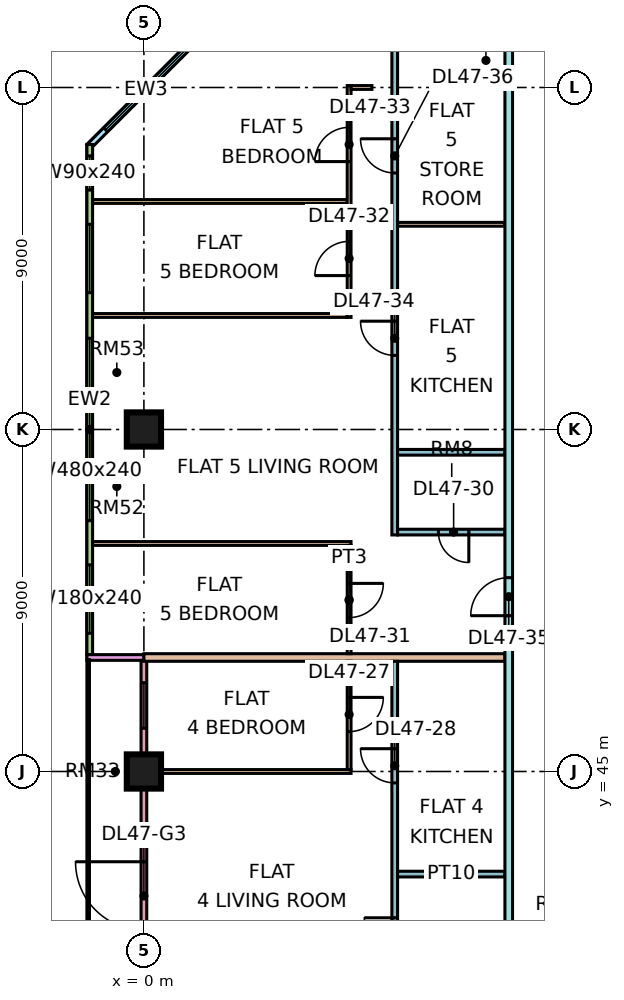
"""IFC4 building model, lengths in metres.
Left out: names, types, materials, properties, quantities, classifications, styles, units other than length and angle.
Written with IfcOpenShell. Run it as: python <this file> out.ifc"""

import sys

from ifc_helpers import new_model, si_unit, direction, frame, frame_2d, origin, origin_2d, place, context, subcontext, project, spatial, rectangle, extrude, element, fill, save


model = new_model("IFC4")
c1 = context("Model", 3, precision=1e-05, world=origin(), true_north=direction((0.0, 1.0)))
c2 = subcontext(c1, "Body", "Model", "MODEL_VIEW")
j1 = project(units=[si_unit("LENGTHUNIT", "METRE"), si_unit("PLANEANGLEUNIT", "RADIAN")], contexts=[c1])
p1 = place(None, origin())
s1 = spatial("IfcSite", under=j1, at=p1, CompositionType="ELEMENT")
p2 = place(p1, origin())
s2 = spatial("IfcBuilding", under=s1, at=p2, CompositionType="ELEMENT")
p3 = place(p2, frame((0.0, 0.0, 202.4)))
s3 = spatial("IfcBuildingStorey", under=s2, at=p3, CompositionType="ELEMENT", Elevation=202.4)
for number, where, z_axis, x_axis in (
    (1, (0.0, 45.0, 0.0), (0.0, 0.0, 1.0), (1.0, 0.0, 0.0)),
    (2, (0.0, 54.0, 0.0), (0.0, 0.0, 1.0), (1.0, 0.0, 0.0)),
):
    element("IfcColumn", number, at=place(p3, frame(where, z_axis=z_axis, x_axis=x_axis)), inside=s3, PredefinedType="COLUMN", context=c2, shape_type="SweptSolid", body=[
        extrude(rectangle(XDim=0.9, YDim=0.9, at=origin_2d()), origin(), (0.0, 0.0, 1.0), 3.75),
    ])
p4 = place(p3, frame((1.553, 64.447, 0.0), z_axis=(0.0, 0.0, 1.0), x_axis=(-0.707106781187, -0.707106781187, 0.0)))
e3 = element("IfcWall", 3, at=p4, inside=s3, PredefinedType="SOLIDWALL", context=c2, shape_type="SweptSolid", body=[
    extrude(rectangle(XDim=4.243, YDim=0.15, at=frame_2d((2.121, 0.0))), origin(), (0.0, 0.0, 1.0), 3.3),
])
p5 = place(p4, frame((0.621, 0.0, 0.45)))
e4 = element("IfcOpeningElement", 4, at=p5, cuts=e3, PredefinedType="OPENING", context=c2, shape_type="SweptSolid", body=[
    extrude(rectangle(XDim=3.0, YDim=2.4, at=frame_2d((1.5, 1.2))), frame((0.0, 0.085, 0.0), z_axis=(0.0, -1.0, 0.0), x_axis=(1.0, 0.0, 0.0)), (0.0, 0.0, 1.0), 0.17),
])
p6 = place(p3, frame((-1.425, 61.5, 0.0), z_axis=(0.0, 0.0, 1.0), x_axis=(0.0, -1.0, 0.0)))
e5 = element("IfcWall", 5, at=p6, inside=s3, PredefinedType="SOLIDWALL", context=c2, shape_type="SweptSolid", body=[
    extrude(rectangle(XDim=13.425, YDim=0.15, at=frame_2d((6.712, 0.0))), origin(), (0.0, 0.0, 1.0), 3.3),
])
p7 = place(p6, frame((0.3, 0.0, 0.45)))
e6 = element("IfcOpeningElement", 6, at=p7, cuts=e5, PredefinedType="OPENING", context=c2, shape_type="SweptSolid", body=[
    extrude(rectangle(XDim=0.9, YDim=2.4, at=frame_2d((0.45, 1.2))), frame((0.0, 0.085, 0.0), z_axis=(0.0, -1.0, 0.0), x_axis=(1.0, 0.0, 0.0)), (0.0, 0.0, 1.0), 0.17),
])
p8 = place(p6, frame((2.1, 0.0, 0.45)))
e7 = element("IfcOpeningElement", 7, at=p8, cuts=e5, PredefinedType="OPENING", context=c2, shape_type="SweptSolid", body=[
    extrude(rectangle(XDim=1.8, YDim=2.4, at=frame_2d((0.9, 1.2))), frame((0.0, 0.085, 0.0), z_axis=(0.0, -1.0, 0.0), x_axis=(1.0, 0.0, 0.0)), (0.0, 0.0, 1.0), 0.17),
])
p9 = place(p6, frame((5.1, 0.0, 0.45)))
e8 = element("IfcOpeningElement", 8, at=p9, cuts=e5, PredefinedType="OPENING", context=c2, shape_type="SweptSolid", body=[
    extrude(rectangle(XDim=4.8, YDim=2.4, at=frame_2d((2.4, 1.2))), frame((0.0, 0.085, 0.0), z_axis=(0.0, -1.0, 0.0), x_axis=(1.0, 0.0, 0.0)), (0.0, 0.0, 1.0), 0.17),
])
p10 = place(p6, frame((11.062, 0.0, 0.45)))
e9 = element("IfcOpeningElement", 9, at=p10, cuts=e5, PredefinedType="OPENING", context=c2, shape_type="SweptSolid", body=[
    extrude(rectangle(XDim=1.8, YDim=2.4, at=frame_2d((0.9, 1.2))), frame((0.0, 0.085, 0.0), z_axis=(0.0, -1.0, 0.0), x_axis=(1.0, 0.0, 0.0)), (0.0, 0.0, 1.0), 0.17),
])
p11 = place(p3, frame((0.0, 47.925, 0.0), z_axis=(0.0, 0.0, 1.0), x_axis=(0.0, -1.0, 0.0)))
e10 = element("IfcWall", 10, at=p11, inside=s3, PredefinedType="SOLIDWALL", context=c2, shape_type="SweptSolid", body=[
    extrude(rectangle(XDim=11.85, YDim=0.15, at=frame_2d((5.925, 0.0))), origin(), (0.0, 0.0, 1.0), 3.3),
])
p12 = place(p11, frame((0.587, 0.0, 0.45)))
e11 = element("IfcOpeningElement", 11, at=p12, cuts=e10, PredefinedType="OPENING", context=c2, shape_type="SweptSolid", body=[
    extrude(rectangle(XDim=1.2, YDim=2.4, at=frame_2d((0.6, 1.2))), frame((0.0, 0.085, 0.0), z_axis=(0.0, -1.0, 0.0), x_axis=(1.0, 0.0, 0.0)), (0.0, 0.0, 1.0), 0.17),
])
p13 = place(p11, frame((5.3, 0.0, 0.0)))
e12 = element("IfcOpeningElement", 12, at=p13, cuts=e10, PredefinedType="OPENING", context=c2, shape_type="SweptSolid", body=[
    extrude(rectangle(XDim=1.8, YDim=2.4, at=frame_2d((0.9, 1.2))), frame((0.0, 0.085, 0.0), z_axis=(0.0, -1.0, 0.0), x_axis=(1.0, 0.0, 0.0)), (0.0, 0.0, 1.0), 0.17),
])
p14 = place(p11, frame((9.55, 0.0, 0.45)))
e13 = element("IfcOpeningElement", 13, at=p14, cuts=e10, PredefinedType="OPENING", context=c2, shape_type="SweptSolid", body=[
    extrude(rectangle(XDim=1.2, YDim=2.4, at=frame_2d((0.6, 1.2))), frame((0.0, 0.085, 0.0), z_axis=(0.0, -1.0, 0.0), x_axis=(1.0, 0.0, 0.0)), (0.0, 0.0, 1.0), 0.17),
])
p15 = place(p3, frame((-1.5, 48.0, 0.0), z_axis=(0.0, 0.0, 1.0), x_axis=(1.0, 0.0, 0.0)))
e14 = element("IfcWall", 14, at=p15, inside=s3, PredefinedType="SOLIDWALL", context=c2, shape_type="SweptSolid", body=[
    extrude(rectangle(XDim=1.5, YDim=0.15, at=frame_2d((0.75, 0.0))), origin(), (0.0, 0.0, 1.0), 3.3),
])
p16 = place(p3, frame((-1.351, 60.0, 0.0), z_axis=(0.0, 0.0, 1.0), x_axis=(1.0, 0.0, 0.0)))
e15 = element("IfcWall", 15, at=p16, inside=s3, PredefinedType="PARTITIONING", context=c2, shape_type="SweptSolid", body=[
    extrude(rectangle(XDim=6.701, YDim=0.1, at=frame_2d((3.351, 0.0))), origin(), (0.0, 0.0, 1.0), 3.3),
])
p17 = place(p3, frame((0.0, 48.0, 0.0), z_axis=(0.0, 0.0, 1.0), x_axis=(1.0, 0.0, 0.0)))
e16 = element("IfcWall", 16, at=p17, inside=s3, PredefinedType="PARTITIONING", context=c2, shape_type="SweptSolid", body=[
    extrude(rectangle(XDim=9.5, YDim=0.2, at=frame_2d((4.75, 0.0))), origin(), (0.0, 0.0, 1.0), 3.3),
])
p18 = place(p3, frame((-1.35, 51.0, 0.0), z_axis=(0.0, 0.0, 1.0), x_axis=(1.0, 0.0, 0.0)))
e17 = element("IfcWall", 17, at=p18, inside=s3, PredefinedType="PARTITIONING", context=c2, shape_type="SweptSolid", body=[
    extrude(rectangle(XDim=6.8, YDim=0.1, at=frame_2d((3.4, 0.0))), origin(), (0.0, 0.0, 1.0), 3.3),
])
p19 = place(p3, frame((-1.35, 57.0, 0.0), z_axis=(0.0, 0.0, 1.0), x_axis=(1.0, 0.0, 0.0)))
e18 = element("IfcWall", 18, at=p19, inside=s3, PredefinedType="PARTITIONING", context=c2, shape_type="SweptSolid", body=[
    extrude(rectangle(XDim=6.7, YDim=0.1, at=frame_2d((3.35, 0.0))), origin(), (0.0, 0.0, 1.0), 3.3),
])
p20 = place(p3, frame((0.074, 45.0, 0.0), z_axis=(0.0, 0.0, 1.0), x_axis=(1.0, 0.0, 0.0)))
e19 = element("IfcWall", 19, at=p20, inside=s3, PredefinedType="PARTITIONING", context=c2, shape_type="SweptSolid", body=[
    extrude(rectangle(XDim=5.376, YDim=0.1, at=frame_2d((2.688, 0.0))), origin(), (0.0, 0.0, 1.0), 3.3),
])
p21 = place(p3, frame((5.4, 45.05, 0.0), z_axis=(0.0, 0.0, 1.0), x_axis=(0.0, 1.0, 0.0)))
e20 = element("IfcWall", 20, at=p21, inside=s3, PredefinedType="PARTITIONING", context=c2, shape_type="SweptSolid", body=[
    extrude(rectangle(XDim=2.85, YDim=0.1, at=frame_2d((1.425, 0.0))), origin(), (0.0, 0.0, 1.0), 3.3),
])
p22 = place(p21, frame((1.0, 0.0, 0.0)))
e21 = element("IfcOpeningElement", 21, at=p22, cuts=e20, PredefinedType="OPENING", context=c2, shape_type="SweptSolid", body=[
    extrude(rectangle(XDim=0.9, YDim=2.1, at=frame_2d((0.45, 1.05))), frame((0.0, 0.06, 0.0), z_axis=(0.0, -1.0, 0.0), x_axis=(1.0, 0.0, 0.0)), (0.0, 0.0, 1.0), 0.12),
])
p23 = place(p3, frame((5.4, 48.1, 0.0), z_axis=(0.0, 0.0, 1.0), x_axis=(0.0, 1.0, 0.0)))
e22 = element("IfcWall", 22, at=p23, inside=s3, PredefinedType="PARTITIONING", context=c2, shape_type="SweptSolid", body=[
    extrude(rectangle(XDim=2.85, YDim=0.1, at=frame_2d((1.425, 0.0))), origin(), (0.0, 0.0, 1.0), 3.3),
])
p24 = place(p23, frame((0.95, 0.0, 0.0)))
e23 = element("IfcOpeningElement", 23, at=p24, cuts=e22, PredefinedType="OPENING", context=c2, shape_type="SweptSolid", body=[
    extrude(rectangle(XDim=0.9, YDim=2.1, at=frame_2d((0.45, 1.05))), frame((0.0, 0.06, 0.0), z_axis=(0.0, -1.0, 0.0), x_axis=(1.0, 0.0, 0.0)), (0.0, 0.0, 1.0), 0.12),
])
p25 = place(p3, frame((5.4, 56.95, 0.0), z_axis=(0.0, 0.0, 1.0), x_axis=(0.0, 1.0, 0.0)))
e24 = element("IfcWall", 24, at=p25, inside=s3, PredefinedType="PARTITIONING", context=c2, shape_type="SweptSolid", body=[
    extrude(rectangle(XDim=6.1, YDim=0.1, at=frame_2d((3.05, 0.0))), origin(), (0.0, 0.0, 1.0), 3.3),
])
p26 = place(p25, frame((1.1, 0.0, 0.0)))
e25 = element("IfcOpeningElement", 25, at=p26, cuts=e24, PredefinedType="OPENING", context=c2, shape_type="SweptSolid", body=[
    extrude(rectangle(XDim=0.9, YDim=2.1, at=frame_2d((0.45, 1.05))), frame((0.0, 0.06, 0.0), z_axis=(0.0, -1.0, 0.0), x_axis=(1.0, 0.0, 0.0)), (0.0, 0.0, 1.0), 0.12),
])
p27 = place(p25, frame((4.1, 0.0, 0.0)))
e26 = element("IfcOpeningElement", 26, at=p27, cuts=e24, PredefinedType="OPENING", context=c2, shape_type="SweptSolid", body=[
    extrude(rectangle(XDim=0.9, YDim=2.1, at=frame_2d((0.45, 1.05))), frame((0.0, 0.06, 0.0), z_axis=(0.0, -1.0, 0.0), x_axis=(1.0, 0.0, 0.0)), (0.0, 0.0, 1.0), 0.12),
])
p28 = place(p3, frame((5.45, 63.0, 0.0), z_axis=(0.0, 0.0, 1.0), x_axis=(1.0, 0.0, 0.0)))
e27 = element("IfcWall", 27, at=p28, inside=s3, PredefinedType="PARTITIONING", context=c2, shape_type="SweptSolid", body=[
    extrude(rectangle(XDim=0.55, YDim=0.1, at=frame_2d((0.275, 0.0))), origin(), (0.0, 0.0, 1.0), 3.3),
])
p29 = place(p3, frame((6.6, 39.225, 0.0), z_axis=(0.0, 0.0, 1.0), x_axis=(0.0, 1.0, 0.0)))
e28 = element("IfcWall", 28, at=p29, inside=s3, PredefinedType="PARTITIONING", context=c2, shape_type="SweptSolid", body=[
    extrude(rectangle(XDim=8.675, YDim=0.15, at=frame_2d((4.337, 0.0))), origin(), (0.0, 0.0, 1.0), 3.3),
])
p30 = place(p29, frame((1.125, 0.0, 0.0)))
e29 = element("IfcOpeningElement", 29, at=p30, cuts=e28, PredefinedType="OPENING", context=c2, shape_type="SweptSolid", body=[
    extrude(rectangle(XDim=0.8, YDim=2.1, at=frame_2d((0.4, 1.05))), frame((0.0, 0.085, 0.0), z_axis=(0.0, -1.0, 0.0), x_axis=(1.0, 0.0, 0.0)), (0.0, 0.0, 1.0), 0.17),
])
p31 = place(p29, frame((5.475, 0.0, 0.0)))
e30 = element("IfcOpeningElement", 30, at=p31, cuts=e28, PredefinedType="OPENING", context=c2, shape_type="SweptSolid", body=[
    extrude(rectangle(XDim=0.9, YDim=2.1, at=frame_2d((0.45, 1.05))), frame((0.0, 0.085, 0.0), z_axis=(0.0, -1.0, 0.0), x_axis=(1.0, 0.0, 0.0)), (0.0, 0.0, 1.0), 0.17),
])
p32 = place(p3, frame((6.6, 51.225, 0.0), z_axis=(0.0, 0.0, 1.0), x_axis=(0.0, 1.0, 0.0)))
e31 = element("IfcWall", 31, at=p32, inside=s3, PredefinedType="PARTITIONING", context=c2, shape_type="SweptSolid", body=[
    extrude(rectangle(XDim=13.125, YDim=0.15, at=frame_2d((6.562, 0.0))), origin(), (0.0, 0.0, 1.0), 3.3),
])
p33 = place(p32, frame((4.725, 0.0, 0.0)))
e32 = element("IfcOpeningElement", 32, at=p33, cuts=e31, PredefinedType="OPENING", context=c2, shape_type="SweptSolid", body=[
    extrude(rectangle(XDim=0.9, YDim=2.1, at=frame_2d((0.45, 1.05))), frame((0.0, 0.085, 0.0), z_axis=(0.0, -1.0, 0.0), x_axis=(1.0, 0.0, 0.0)), (0.0, 0.0, 1.0), 0.17),
])
p34 = place(p32, frame((9.525, 0.0, 0.0)))
e33 = element("IfcOpeningElement", 33, at=p34, cuts=e31, PredefinedType="OPENING", context=c2, shape_type="SweptSolid", body=[
    extrude(rectangle(XDim=0.9, YDim=2.1, at=frame_2d((0.45, 1.05))), frame((0.0, 0.085, 0.0), z_axis=(0.0, -1.0, 0.0), x_axis=(1.0, 0.0, 0.0)), (0.0, 0.0, 1.0), 0.17),
])
p35 = place(p3, frame((6.675, 42.3, 0.0), z_axis=(0.0, 0.0, 1.0), x_axis=(1.0, 0.0, 0.0)))
e34 = element("IfcWall", 34, at=p35, inside=s3, PredefinedType="PARTITIONING", context=c2, shape_type="SweptSolid", body=[
    extrude(rectangle(XDim=2.825, YDim=0.15, at=frame_2d((1.413, 0.0))), origin(), (0.0, 0.0, 1.0), 3.3),
])
p36 = place(p3, frame((6.675, 51.3, 0.0), z_axis=(0.0, 0.0, 1.0), x_axis=(1.0, 0.0, 0.0)))
e35 = element("IfcWall", 35, at=p36, inside=s3, PredefinedType="PARTITIONING", context=c2, shape_type="SweptSolid", body=[
    extrude(rectangle(XDim=2.825, YDim=0.15, at=frame_2d((1.413, 0.0))), origin(), (0.0, 0.0, 1.0), 3.3),
])
p37 = place(p36, frame((1.075, 0.0, 0.0)))
e36 = element("IfcOpeningElement", 36, at=p37, cuts=e35, PredefinedType="OPENING", context=c2, shape_type="SweptSolid", body=[
    extrude(rectangle(XDim=0.8, YDim=2.1, at=frame_2d((0.4, 1.05))), frame((0.0, 0.085, 0.0), z_axis=(0.0, -1.0, 0.0), x_axis=(1.0, 0.0, 0.0)), (0.0, 0.0, 1.0), 0.17),
])
p38 = place(p3, frame((6.675, 53.4, 0.0), z_axis=(0.0, 0.0, 1.0), x_axis=(1.0, 0.0, 0.0)))
e37 = element("IfcWall", 37, at=p38, inside=s3, PredefinedType="PARTITIONING", context=c2, shape_type="SweptSolid", body=[
    extrude(rectangle(XDim=2.825, YDim=0.15, at=frame_2d((1.413, 0.0))), origin(), (0.0, 0.0, 1.0), 3.3),
])
p39 = place(p3, frame((6.675, 59.4, 0.0), z_axis=(0.0, 0.0, 1.0), x_axis=(1.0, 0.0, 0.0)))
e38 = element("IfcWall", 38, at=p39, inside=s3, PredefinedType="PARTITIONING", context=c2, shape_type="SweptSolid", body=[
    extrude(rectangle(XDim=2.825, YDim=0.1, at=frame_2d((1.413, 0.0))), origin(), (0.0, 0.0, 1.0), 3.3),
])
p40 = place(p3, frame((9.6, 20.0, 0.0), z_axis=(0.0, 0.0, 1.0), x_axis=(0.0, 1.0, 0.0)))
e39 = element("IfcWall", 39, at=p40, inside=s3, PredefinedType="PARTITIONING", context=c2, shape_type="SweptSolid", body=[
    extrude(rectangle(XDim=44.35, YDim=0.2, at=frame_2d((22.175, 0.0))), origin(), (0.0, 0.0, 1.0), 3.3),
])
p41 = place(p40, frame((17.1, 0.0, 0.0)))
e40 = element("IfcOpeningElement", 40, at=p41, cuts=e39, PredefinedType="OPENING", context=c2, shape_type="SweptSolid", body=[
    extrude(rectangle(XDim=1.0, YDim=2.1, at=frame_2d((0.5, 1.05))), frame((0.0, 0.11, 0.0), z_axis=(0.0, -1.0, 0.0), x_axis=(1.0, 0.0, 0.0)), (0.0, 0.0, 1.0), 0.22),
])
p42 = place(p40, frame((29.1, 0.0, 0.0)))
e41 = element("IfcOpeningElement", 41, at=p42, cuts=e39, PredefinedType="OPENING", context=c2, shape_type="SweptSolid", body=[
    extrude(rectangle(XDim=1.0, YDim=2.1, at=frame_2d((0.5, 1.05))), frame((0.0, 0.11, 0.0), z_axis=(0.0, -1.0, 0.0), x_axis=(1.0, 0.0, 0.0)), (0.0, 0.0, 1.0), 0.22),
])
p43 = place(p40, frame((0.6, 0.0, 0.0)))
e42 = element("IfcOpeningElement", 42, at=p43, cuts=e39, PredefinedType="OPENING", context=c2, shape_type="SweptSolid", body=[
    extrude(rectangle(XDim=1.2, YDim=2.1, at=frame_2d((0.6, 1.05))), frame((0.0, 0.11, 0.0), z_axis=(0.0, -1.0, 0.0), x_axis=(1.0, 0.0, 0.0)), (0.0, 0.0, 1.0), 0.22),
])
p44 = place(p40, frame((4.35, 0.0, 0.0)))
e43 = element("IfcOpeningElement", 43, at=p44, cuts=e39, PredefinedType="OPENING", context=c2, shape_type="SweptSolid", body=[
    extrude(rectangle(XDim=1.0, YDim=2.1, at=frame_2d((0.5, 1.05))), frame((0.0, 0.11, 0.0), z_axis=(0.0, -1.0, 0.0), x_axis=(1.0, 0.0, 0.0)), (0.0, 0.0, 1.0), 0.22),
])
p45 = place(p5, origin())
e44 = element("IfcWindow", 44, at=p45, inside=s3, PartitioningType="SINGLE_PANEL", PredefinedType="WINDOW", context=c2, shape_type="SweptSolid", body=[
    extrude(rectangle(XDim=3.0, YDim=2.4, at=frame_2d((1.5, 1.2))), frame((0.0, 0.03, 0.0), z_axis=(0.0, -1.0, 0.0), x_axis=(1.0, 0.0, 0.0)), (0.0, 0.0, 1.0), 0.06),
])
fill(e4, e44)
p46 = place(p7, origin())
e45 = element("IfcWindow", 45, at=p46, inside=s3, PartitioningType="SINGLE_PANEL", PredefinedType="WINDOW", context=c2, shape_type="SweptSolid", body=[
    extrude(rectangle(XDim=0.9, YDim=2.4, at=frame_2d((0.45, 1.2))), frame((0.0, 0.03, 0.0), z_axis=(0.0, -1.0, 0.0), x_axis=(1.0, 0.0, 0.0)), (0.0, 0.0, 1.0), 0.06),
])
fill(e6, e45)
p47 = place(p8, origin())
e46 = element("IfcWindow", 46, at=p47, inside=s3, PartitioningType="SINGLE_PANEL", PredefinedType="WINDOW", context=c2, shape_type="SweptSolid", body=[
    extrude(rectangle(XDim=1.8, YDim=2.4, at=frame_2d((0.9, 1.2))), frame((0.0, 0.03, 0.0), z_axis=(0.0, -1.0, 0.0), x_axis=(1.0, 0.0, 0.0)), (0.0, 0.0, 1.0), 0.06),
])
fill(e7, e46)
p48 = place(p9, origin())
e47 = element("IfcWindow", 47, at=p48, inside=s3, PartitioningType="SINGLE_PANEL", PredefinedType="WINDOW", context=c2, shape_type="SweptSolid", body=[
    extrude(rectangle(XDim=4.8, YDim=2.4, at=frame_2d((2.4, 1.2))), frame((0.0, 0.03, 0.0), z_axis=(0.0, -1.0, 0.0), x_axis=(1.0, 0.0, 0.0)), (0.0, 0.0, 1.0), 0.06),
])
fill(e8, e47)
p49 = place(p10, origin())
e48 = element("IfcWindow", 48, at=p49, inside=s3, PartitioningType="SINGLE_PANEL", PredefinedType="WINDOW", context=c2, shape_type="SweptSolid", body=[
    extrude(rectangle(XDim=1.8, YDim=2.4, at=frame_2d((0.9, 1.2))), frame((0.0, 0.03, 0.0), z_axis=(0.0, -1.0, 0.0), x_axis=(1.0, 0.0, 0.0)), (0.0, 0.0, 1.0), 0.06),
])
fill(e9, e48)
p50 = place(p12, origin())
e49 = element("IfcWindow", 49, at=p50, inside=s3, PartitioningType="SINGLE_PANEL", PredefinedType="WINDOW", context=c2, shape_type="SweptSolid", body=[
    extrude(rectangle(XDim=1.2, YDim=2.4, at=frame_2d((0.6, 1.2))), frame((0.0, 0.03, 0.0), z_axis=(0.0, -1.0, 0.0), x_axis=(1.0, 0.0, 0.0)), (0.0, 0.0, 1.0), 0.06),
])
fill(e11, e49)
p51 = place(p13, frame((1.8, 0.0, 0.0), z_axis=(0.0, 0.0, 1.0), x_axis=(-1.0, 0.0, 0.0)))
e50 = element("IfcDoor", 50, at=p51, inside=s3, OperationType="DOUBLE_DOOR_SINGLE_SWING", PredefinedType="DOOR", context=c2, shape_type="SweptSolid", body=[
    extrude(rectangle(XDim=1.8, YDim=2.4, at=frame_2d((0.9, 1.2))), frame((0.0, 0.025, 0.0), z_axis=(0.0, -1.0, 0.0), x_axis=(1.0, 0.0, 0.0)), (0.0, 0.0, 1.0), 0.05),
])
fill(e12, e50)
p52 = place(p30, frame((0.8, 0.0, 0.0), z_axis=(0.0, 0.0, 1.0), x_axis=(-1.0, 0.0, 0.0)))
e51 = element("IfcDoor", 51, at=p52, inside=s3, OperationType="SINGLE_SWING_RIGHT", PredefinedType="DOOR", context=c2, shape_type="SweptSolid", body=[
    extrude(rectangle(XDim=0.8, YDim=2.1, at=frame_2d((0.4, 1.05))), frame((0.0, 0.025, 0.0), z_axis=(0.0, -1.0, 0.0), x_axis=(1.0, 0.0, 0.0)), (0.0, 0.0, 1.0), 0.05),
])
fill(e29, e51)
p53 = place(p22, origin())
e52 = element("IfcDoor", 52, at=p53, inside=s3, OperationType="SINGLE_SWING_RIGHT", PredefinedType="DOOR", context=c2, shape_type="SweptSolid", body=[
    extrude(rectangle(XDim=0.9, YDim=2.1, at=frame_2d((0.45, 1.05))), frame((0.0, 0.025, 0.0), z_axis=(0.0, -1.0, 0.0), x_axis=(1.0, 0.0, 0.0)), (0.0, 0.0, 1.0), 0.05),
])
fill(e21, e52)
p54 = place(p31, frame((0.9, 0.0, 0.0), z_axis=(0.0, 0.0, 1.0), x_axis=(-1.0, 0.0, 0.0)))
e53 = element("IfcDoor", 53, at=p54, inside=s3, OperationType="SINGLE_SWING_RIGHT", PredefinedType="DOOR", context=c2, shape_type="SweptSolid", body=[
    extrude(rectangle(XDim=0.9, YDim=2.1, at=frame_2d((0.45, 1.05))), frame((0.0, 0.025, 0.0), z_axis=(0.0, -1.0, 0.0), x_axis=(1.0, 0.0, 0.0)), (0.0, 0.0, 1.0), 0.05),
])
fill(e30, e53)
p55 = place(p37, origin())
e54 = element("IfcDoor", 54, at=p55, inside=s3, OperationType="SINGLE_SWING_RIGHT", PredefinedType="DOOR", context=c2, shape_type="SweptSolid", body=[
    extrude(rectangle(XDim=0.8, YDim=2.1, at=frame_2d((0.4, 1.05))), frame((0.0, 0.025, 0.0), z_axis=(0.0, -1.0, 0.0), x_axis=(1.0, 0.0, 0.0)), (0.0, 0.0, 1.0), 0.05),
])
fill(e36, e54)
p56 = place(p24, origin())
e55 = element("IfcDoor", 55, at=p56, inside=s3, OperationType="SINGLE_SWING_RIGHT", PredefinedType="DOOR", context=c2, shape_type="SweptSolid", body=[
    extrude(rectangle(XDim=0.9, YDim=2.1, at=frame_2d((0.45, 1.05))), frame((0.0, 0.025, 0.0), z_axis=(0.0, -1.0, 0.0), x_axis=(1.0, 0.0, 0.0)), (0.0, 0.0, 1.0), 0.05),
])
fill(e23, e55)
p57 = place(p26, origin())
e56 = element("IfcDoor", 56, at=p57, inside=s3, OperationType="SINGLE_SWING_LEFT", PredefinedType="DOOR", context=c2, shape_type="SweptSolid", body=[
    extrude(rectangle(XDim=0.9, YDim=2.1, at=frame_2d((0.45, 1.05))), frame((0.0, 0.025, 0.0), z_axis=(0.0, -1.0, 0.0), x_axis=(1.0, 0.0, 0.0)), (0.0, 0.0, 1.0), 0.05),
])
fill(e25, e56)
p58 = place(p27, origin())
e57 = element("IfcDoor", 57, at=p58, inside=s3, OperationType="SINGLE_SWING_LEFT", PredefinedType="DOOR", context=c2, shape_type="SweptSolid", body=[
    extrude(rectangle(XDim=0.9, YDim=2.1, at=frame_2d((0.45, 1.05))), frame((0.0, 0.025, 0.0), z_axis=(0.0, -1.0, 0.0), x_axis=(1.0, 0.0, 0.0)), (0.0, 0.0, 1.0), 0.05),
])
fill(e26, e57)
p59 = place(p33, frame((0.9, 0.0, 0.0), z_axis=(0.0, 0.0, 1.0), x_axis=(-1.0, 0.0, 0.0)))
e58 = element("IfcDoor", 58, at=p59, inside=s3, OperationType="SINGLE_SWING_RIGHT", PredefinedType="DOOR", context=c2, shape_type="SweptSolid", body=[
    extrude(rectangle(XDim=0.9, YDim=2.1, at=frame_2d((0.45, 1.05))), frame((0.0, 0.025, 0.0), z_axis=(0.0, -1.0, 0.0), x_axis=(1.0, 0.0, 0.0)), (0.0, 0.0, 1.0), 0.05),
])
fill(e32, e58)
p60 = place(p42, origin())
e59 = element("IfcDoor", 59, at=p60, inside=s3, OperationType="SINGLE_SWING_LEFT", PredefinedType="DOOR", context=c2, shape_type="SweptSolid", body=[
    extrude(rectangle(XDim=1.0, YDim=2.1, at=frame_2d((0.5, 1.05))), frame((0.0, 0.025, 0.0), z_axis=(0.0, -1.0, 0.0), x_axis=(1.0, 0.0, 0.0)), (0.0, 0.0, 1.0), 0.05),
])
fill(e41, e59)
p61 = place(p34, frame((0.9, 0.0, 0.0), z_axis=(0.0, 0.0, 1.0), x_axis=(-1.0, 0.0, 0.0)))
e60 = element("IfcDoor", 60, at=p61, inside=s3, OperationType="SINGLE_SWING_RIGHT", PredefinedType="DOOR", context=c2, shape_type="SweptSolid", body=[
    extrude(rectangle(XDim=0.9, YDim=2.1, at=frame_2d((0.45, 1.05))), frame((0.0, 0.025, 0.0), z_axis=(0.0, -1.0, 0.0), x_axis=(1.0, 0.0, 0.0)), (0.0, 0.0, 1.0), 0.05),
])
fill(e33, e60)
save(model, sys.argv[1])
